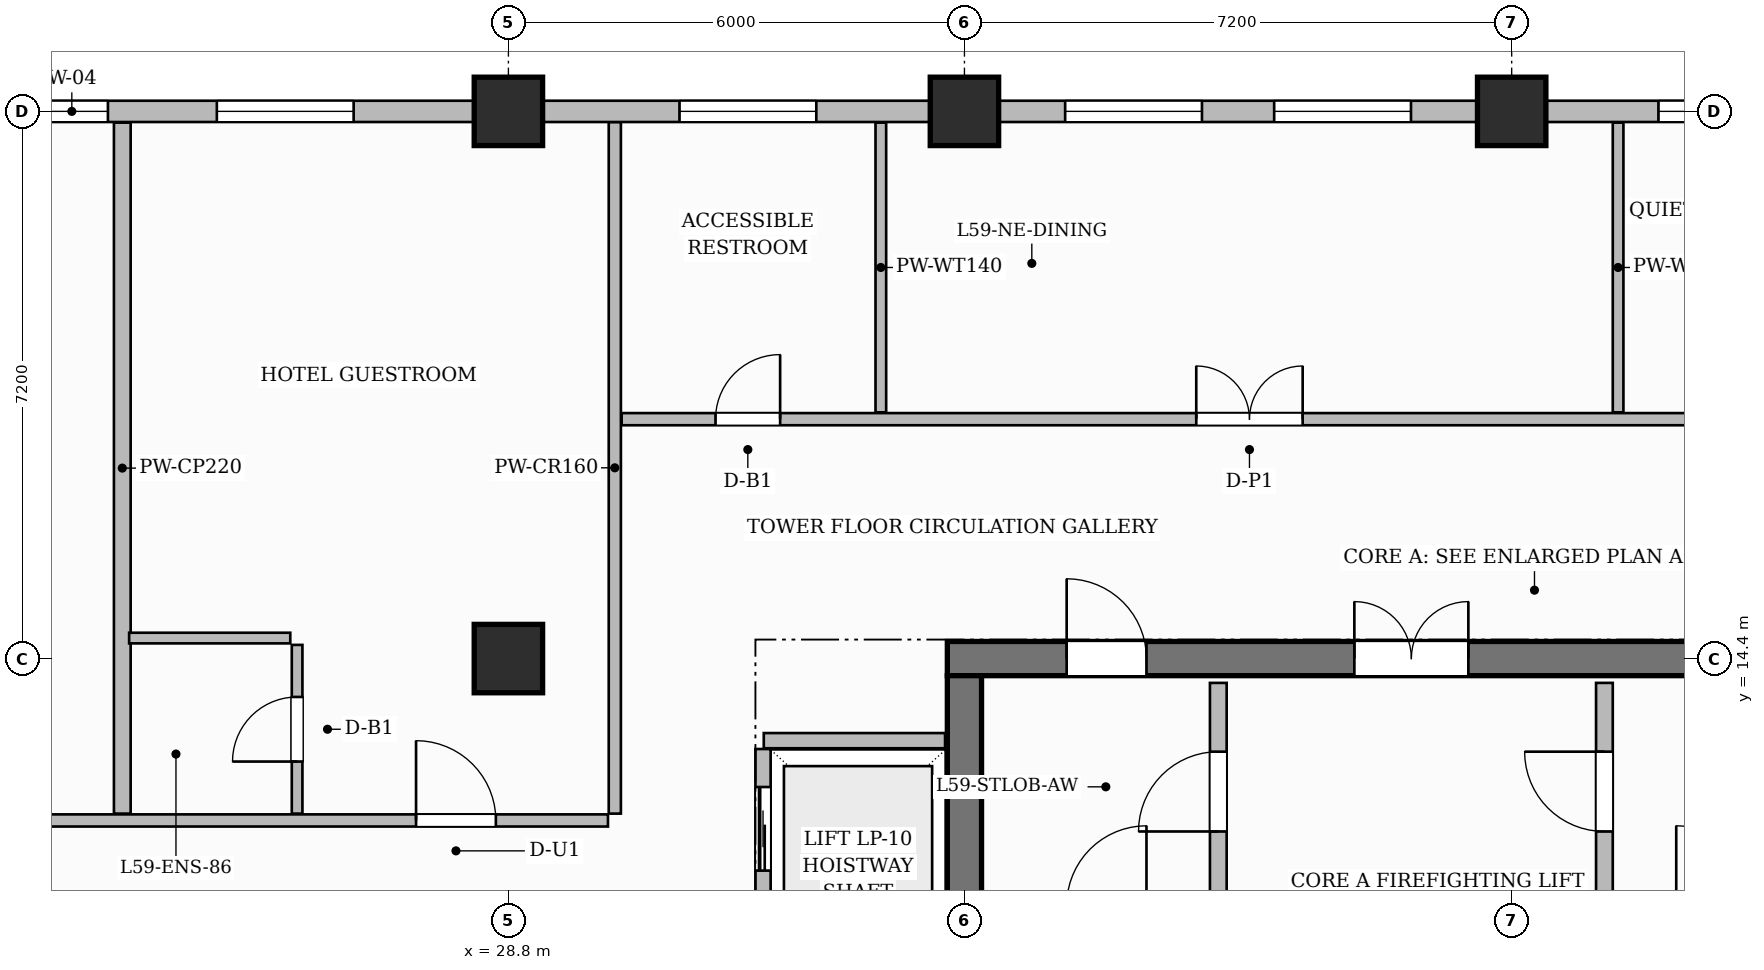
"""IFC4 building model, lengths in metres.
Left out: names, types, materials, properties, quantities, classifications, styles, units other than length and angle.
Written with IfcOpenShell. Run it as: python <this file> out.ifc"""

import sys

from ifc_helpers import new_model, si_unit, direction, frame, frame_2d, origin, origin_2d, place, context, subcontext, project, spatial, rectangle, extrude, source, transform, mapped, element, fill, save


model = new_model("IFC4")
c1 = context("Model", 3, precision=1e-05, world=origin(), true_north=direction((0.0, 1.0)))
c2 = subcontext(c1, "Body", "Model", "MODEL_VIEW")
j1 = project(units=[si_unit("LENGTHUNIT", "METRE"), si_unit("PLANEANGLEUNIT", "RADIAN")], contexts=[c1])
p1 = place(None, origin())
s1 = spatial("IfcSite", under=j1, at=p1, CompositionType="ELEMENT")
p2 = place(p1, origin())
s2 = spatial("IfcBuilding", under=s1, at=p2, CompositionType="ELEMENT")
p3 = place(p2, frame((0.0, 0.0, 236.55)))
s3 = spatial("IfcBuildingStorey", under=s2, at=p3, CompositionType="ELEMENT", Elevation=236.55)
p4 = place(p3, frame((34.575, 14.4, 0.0), z_axis=(0.0, 0.0, 1.0), x_axis=(1.0, 0.0, 0.0)))
e1 = element("IfcWall", 1, at=p4, inside=s3, PredefinedType="SHEAR", context=c2, shape_type="SweptSolid", body=[
    extrude(rectangle(XDim=15.45, YDim=0.45, at=frame_2d((7.725, 0.0))), origin(), (0.0, 0.0, 1.0), 3.85),
])
p5 = place(p4, frame((5.355, 0.0, 0.0)))
e2 = element("IfcOpeningElement", 2, at=p5, cuts=e1, PredefinedType="OPENING", context=c2, shape_type="SweptSolid", body=[
    extrude(rectangle(XDim=1.5, YDim=2.2, at=frame_2d((0.75, 1.1))), frame((0.0, 0.235, 0.0), z_axis=(0.0, -1.0, 0.0), x_axis=(1.0, 0.0, 0.0)), (0.0, 0.0, 1.0), 0.47),
])
p6 = place(p4, frame((1.57, 0.0, 0.0)))
e3 = element("IfcOpeningElement", 3, at=p6, cuts=e1, PredefinedType="OPENING", context=c2, shape_type="SweptSolid", body=[
    extrude(rectangle(XDim=1.05, YDim=2.15, at=frame_2d((0.525, 1.075))), frame((0.0, 0.235, 0.0), z_axis=(0.0, -1.0, 0.0), x_axis=(1.0, 0.0, 0.0)), (0.0, 0.0, 1.0), 0.47),
])
p7 = place(p4, frame((11.2, 0.0, 0.0)))
e4 = element("IfcOpeningElement", 4, at=p7, cuts=e1, PredefinedType="OPENING", context=c2, shape_type="SweptSolid", body=[
    extrude(rectangle(XDim=1.05, YDim=2.15, at=frame_2d((0.525, 1.075))), frame((0.0, 0.235, 0.0), z_axis=(0.0, -1.0, 0.0), x_axis=(1.0, 0.0, 0.0)), (0.0, 0.0, 1.0), 0.47),
])
p8 = place(p3, frame((34.8, 3.825, 0.0), z_axis=(0.0, 0.0, 1.0), x_axis=(0.0, 1.0, 0.0)))
e5 = element("IfcWall", 5, at=p8, inside=s3, PredefinedType="SHEAR", context=c2, shape_type="SweptSolid", body=[
    extrude(rectangle(XDim=10.35, YDim=0.45, at=frame_2d((5.175, 0.0))), origin(), (0.0, 0.0, 1.0), 3.85),
])
m1 = source(origin(), c2, "Body", "SweptSolid", [
    extrude(rectangle(XDim=0.9, YDim=0.9, at=origin_2d()), origin(), (0.0, 0.0, 1.0), 3.85),
])
for number, where, z_axis, x_axis in (
    (6, (28.8, 14.4, 0.0), (0.0, 0.0, 1.0), (1.0, 0.0, 0.0)),
    (7, (28.8, 21.6, 0.0), (0.0, 0.0, 1.0), (1.0, 0.0, 0.0)),
    (8, (34.8, 21.6, 0.0), (0.0, 0.0, 1.0), (1.0, 0.0, 0.0)),
    (9, (42.0, 21.6, 0.0), (0.0, 0.0, 1.0), (1.0, 0.0, 0.0)),
):
    element("IfcColumn", number, at=place(p3, frame(where, z_axis=z_axis, x_axis=x_axis)), inside=s3, PredefinedType="COLUMN", context=c2, shape_type="MappedRepresentation", body=[
        mapped(m1, transform((0.0, 0.0, 0.0), scale=1.0)),
    ])
p9 = place(p3, frame((38.14, 11.22, 0.0), z_axis=(0.0, 0.0, 1.0), x_axis=(0.0, 1.0, 0.0)))
e10 = element("IfcWall", 10, at=p9, inside=s3, PredefinedType="PARTITIONING", context=c2, shape_type="SweptSolid", body=[
    extrude(rectangle(XDim=2.86, YDim=0.22, at=frame_2d((1.43, 0.0))), origin(), (0.0, 0.0, 1.0), 3.6),
])
p10 = place(p9, frame((0.905, 0.0, 0.0)))
e11 = element("IfcOpeningElement", 11, at=p10, cuts=e10, PredefinedType="OPENING", context=c2, shape_type="SweptSolid", body=[
    extrude(rectangle(XDim=1.05, YDim=2.15, at=frame_2d((0.525, 1.075))), frame((0.0, 0.12, 0.0), z_axis=(0.0, -1.0, 0.0), x_axis=(1.0, 0.0, 0.0)), (0.0, 0.0, 1.0), 0.24),
])
p11 = place(p3, frame((43.22, 11.22, 0.0), z_axis=(0.0, 0.0, 1.0), x_axis=(0.0, 1.0, 0.0)))
e12 = element("IfcWall", 12, at=p11, inside=s3, PredefinedType="PARTITIONING", context=c2, shape_type="SweptSolid", body=[
    extrude(rectangle(XDim=2.86, YDim=0.22, at=frame_2d((1.43, 0.0))), origin(), (0.0, 0.0, 1.0), 3.6),
])
p12 = place(p11, frame((0.905, 0.0, 0.0)))
e13 = element("IfcOpeningElement", 13, at=p12, cuts=e12, PredefinedType="OPENING", context=c2, shape_type="SweptSolid", body=[
    extrude(rectangle(XDim=1.05, YDim=2.15, at=frame_2d((0.525, 1.075))), frame((0.0, 0.12, 0.0), z_axis=(0.0, -1.0, 0.0), x_axis=(1.0, 0.0, 0.0)), (0.0, 0.0, 1.0), 0.24),
])
p13 = place(p3, frame((32.16, 13.32, 0.0), z_axis=(0.0, 0.0, 1.0), x_axis=(1.0, 0.0, 0.0)))
e14 = element("IfcWall", 14, at=p13, inside=s3, PredefinedType="PARTITIONING", context=c2, shape_type="SweptSolid", body=[
    extrude(rectangle(XDim=2.385, YDim=0.2, at=frame_2d((1.192, 0.0))), origin(), (0.0, 0.0, 1.0), 3.6),
])
p14 = place(p3, frame((32.15, 4.39, 0.0), z_axis=(0.0, 0.0, 1.0), x_axis=(0.0, 1.0, 0.0)))
e15 = element("IfcWall", 15, at=p14, inside=s3, PredefinedType="PARTITIONING", context=c2, shape_type="SweptSolid", body=[
    extrude(rectangle(XDim=8.82, YDim=0.2, at=frame_2d((4.41, 0.0))), origin(), (0.0, 0.0, 1.0), 3.6),
])
p15 = place(p14, frame((0.5, 0.0, 0.0)))
e16 = element("IfcOpeningElement", 16, at=p15, cuts=e15, PredefinedType="OPENING", context=c2, shape_type="SweptSolid", body=[
    extrude(rectangle(XDim=1.1, YDim=2.2, at=frame_2d((0.55, 1.1))), frame((0.0, 0.11, 0.0), z_axis=(0.0, -1.0, 0.0), x_axis=(1.0, 0.0, 0.0)), (0.0, 0.0, 1.0), 0.22),
])
p16 = place(p14, frame((2.74, 0.0, 0.0)))
e17 = element("IfcOpeningElement", 17, at=p16, cuts=e15, PredefinedType="OPENING", context=c2, shape_type="SweptSolid", body=[
    extrude(rectangle(XDim=1.1, YDim=2.2, at=frame_2d((0.55, 1.1))), frame((0.0, 0.11, 0.0), z_axis=(0.0, -1.0, 0.0), x_axis=(1.0, 0.0, 0.0)), (0.0, 0.0, 1.0), 0.22),
])
p17 = place(p14, frame((4.98, 0.0, 0.0)))
e18 = element("IfcOpeningElement", 18, at=p17, cuts=e15, PredefinedType="OPENING", context=c2, shape_type="SweptSolid", body=[
    extrude(rectangle(XDim=1.1, YDim=2.2, at=frame_2d((0.55, 1.1))), frame((0.0, 0.11, 0.0), z_axis=(0.0, -1.0, 0.0), x_axis=(1.0, 0.0, 0.0)), (0.0, 0.0, 1.0), 0.22),
])
p18 = place(p14, frame((7.22, 0.0, 0.0)))
e19 = element("IfcOpeningElement", 19, at=p18, cuts=e15, PredefinedType="OPENING", context=c2, shape_type="SweptSolid", body=[
    extrude(rectangle(XDim=1.1, YDim=2.2, at=frame_2d((0.55, 1.1))), frame((0.0, 0.11, 0.0), z_axis=(0.0, -1.0, 0.0), x_axis=(1.0, 0.0, 0.0)), (0.0, 0.0, 1.0), 0.22),
])
p19 = place(p3, frame((14.548, 12.27, 0.0), z_axis=(0.0, 0.0, 1.0), x_axis=(1.0, 0.0, 0.0)))
e20 = element("IfcWall", 20, at=p19, inside=s3, PredefinedType="PARTITIONING", context=c2, shape_type="SweptSolid", body=[
    extrude(rectangle(XDim=15.562, YDim=0.16, at=frame_2d((7.781, 0.0))), origin(), (0.0, 0.0, 1.0), 3.6),
])
p20 = place(p19, frame((5.212, 0.0, 0.0)))
e21 = element("IfcOpeningElement", 21, at=p20, cuts=e20, PredefinedType="OPENING", context=c2, shape_type="SweptSolid", body=[
    extrude(rectangle(XDim=1.0, YDim=2.2, at=frame_2d((0.5, 1.1))), frame((0.0, 0.09, 0.0), z_axis=(0.0, -1.0, 0.0), x_axis=(1.0, 0.0, 0.0)), (0.0, 0.0, 1.0), 0.18),
])
p21 = place(p19, frame((13.037, 0.0, 0.0)))
e22 = element("IfcOpeningElement", 22, at=p21, cuts=e20, PredefinedType="OPENING", context=c2, shape_type="SweptSolid", body=[
    extrude(rectangle(XDim=1.05, YDim=2.25, at=frame_2d((0.525, 1.125))), frame((0.0, 0.09, 0.0), z_axis=(0.0, -1.0, 0.0), x_axis=(1.0, 0.0, 0.0)), (0.0, 0.0, 1.0), 0.18),
])
p22 = place(p3, frame((30.2, 12.36, 0.0), z_axis=(0.0, 0.0, 1.0), x_axis=(0.0, 1.0, 0.0)))
e23 = element("IfcWall", 23, at=p22, inside=s3, PredefinedType="PARTITIONING", context=c2, shape_type="SweptSolid", body=[
    extrude(rectangle(XDim=9.1, YDim=0.16, at=frame_2d((4.55, 0.0))), origin(), (0.0, 0.0, 1.0), 3.6),
])
p23 = place(p3, frame((30.29, 17.55, 0.0), z_axis=(0.0, 0.0, 1.0), x_axis=(1.0, 0.0, 0.0)))
e24 = element("IfcWall", 24, at=p23, inside=s3, PredefinedType="PARTITIONING", context=c2, shape_type="SweptSolid", body=[
    extrude(rectangle(XDim=19.37, YDim=0.16, at=frame_2d((9.685, 0.0))), origin(), (0.0, 0.0, 1.0), 3.6),
])
p24 = place(p23, frame((1.235, 0.0, 0.0)))
e25 = element("IfcOpeningElement", 25, at=p24, cuts=e24, PredefinedType="OPENING", context=c2, shape_type="SweptSolid", body=[
    extrude(rectangle(XDim=0.85, YDim=2.1, at=frame_2d((0.425, 1.05))), frame((0.0, 0.09, 0.0), z_axis=(0.0, -1.0, 0.0), x_axis=(1.0, 0.0, 0.0)), (0.0, 0.0, 1.0), 0.18),
])
p25 = place(p23, frame((7.56, 0.0, 0.0)))
e26 = element("IfcOpeningElement", 26, at=p25, cuts=e24, PredefinedType="OPENING", context=c2, shape_type="SweptSolid", body=[
    extrude(rectangle(XDim=1.4, YDim=2.35, at=frame_2d((0.7, 1.175))), frame((0.0, 0.09, 0.0), z_axis=(0.0, -1.0, 0.0), x_axis=(1.0, 0.0, 0.0)), (0.0, 0.0, 1.0), 0.18),
])
p26 = place(p23, frame((15.785, 0.0, 0.0)))
e27 = element("IfcOpeningElement", 27, at=p26, cuts=e24, PredefinedType="OPENING", context=c2, shape_type="SweptSolid", body=[
    extrude(rectangle(XDim=0.95, YDim=2.15, at=frame_2d((0.475, 1.075))), frame((0.0, 0.09, 0.0), z_axis=(0.0, -1.0, 0.0), x_axis=(1.0, 0.0, 0.0)), (0.0, 0.0, 1.0), 0.18),
])
for number, where, z_axis, x_axis in (
    (28, (33.7, 17.64, 0.0), (0.0, 0.0, 1.0), (0.0, 1.0, 0.0)),
    (29, (43.4, 17.64, 0.0), (0.0, 0.0, 1.0), (0.0, 1.0, 0.0)),
):
    element("IfcWall", number, at=place(p3, frame(where, z_axis=z_axis, x_axis=x_axis)), inside=s3, PredefinedType="PARTITIONING", context=c2, shape_type="SweptSolid", body=[
        extrude(rectangle(XDim=3.812, YDim=0.14, at=frame_2d((1.906, 0.0))), origin(), (0.0, 0.0, 1.0), 3.6),
    ])
p27 = place(p3, frame((23.72, 12.36, 0.0), z_axis=(0.0, 0.0, 1.0), x_axis=(0.0, 1.0, 0.0)))
e30 = element("IfcWall", 30, at=p27, inside=s3, PredefinedType="PARTITIONING", context=c2, shape_type="SweptSolid", body=[
    extrude(rectangle(XDim=9.092, YDim=0.22, at=frame_2d((4.546, 0.0))), origin(), (0.0, 0.0, 1.0), 3.6),
])
p28 = place(p3, frame((26.02, 12.36, 0.0), z_axis=(0.0, 0.0, 1.0), x_axis=(0.0, 1.0, 0.0)))
e31 = element("IfcWall", 31, at=p28, inside=s3, PredefinedType="PARTITIONING", context=c2, shape_type="SweptSolid", body=[
    extrude(rectangle(XDim=2.22, YDim=0.14, at=frame_2d((1.11, 0.0))), origin(), (0.0, 0.0, 1.0), 3.6),
])
p29 = place(p28, frame((0.685, 0.0, 0.0)))
e32 = element("IfcOpeningElement", 32, at=p29, cuts=e31, PredefinedType="OPENING", context=c2, shape_type="SweptSolid", body=[
    extrude(rectangle(XDim=0.85, YDim=2.1, at=frame_2d((0.425, 1.05))), frame((0.0, 0.08, 0.0), z_axis=(0.0, -1.0, 0.0), x_axis=(1.0, 0.0, 0.0)), (0.0, 0.0, 1.0), 0.16),
])
p30 = place(p3, frame((23.81, 14.67, 0.0), z_axis=(0.0, 0.0, 1.0), x_axis=(1.0, 0.0, 0.0)))
e33 = element("IfcWall", 33, at=p30, inside=s3, PredefinedType="PARTITIONING", context=c2, shape_type="SweptSolid", body=[
    extrude(rectangle(XDim=2.12, YDim=0.14, at=frame_2d((1.06, 0.0))), origin(), (0.0, 0.0, 1.0), 3.135),
])
p31 = place(p3, frame((14.4, 21.6, 0.0), z_axis=(0.0, 0.0, 1.0), x_axis=(1.0, 0.0, 0.0)))
e34 = element("IfcWall", 34, at=p31, inside=s3, PredefinedType="SOLIDWALL", context=c2, shape_type="SweptSolid", body=[
    extrude(rectangle(XDim=35.4, YDim=0.28, at=frame_2d((17.7, 0.0))), origin(), (0.0, 0.0, 1.0), 3.135),
])
p32 = place(p31, frame((0.85, 0.0, 0.0)))
e35 = element("IfcOpeningElement", 35, at=p32, cuts=e34, PredefinedType="OPENING", context=c2, shape_type="SweptSolid", body=[
    extrude(rectangle(XDim=1.2, YDim=2.2, at=frame_2d((0.6, 1.1))), frame((0.0, 0.15, 0.0), z_axis=(0.0, -1.0, 0.0), x_axis=(1.0, 0.0, 0.0)), (0.0, 0.0, 1.0), 0.3),
])
p33 = place(p31, frame((3.475, 0.0, 0.8)))
e36 = element("IfcOpeningElement", 36, at=p33, cuts=e34, PredefinedType="OPENING", context=c2, shape_type="SweptSolid", body=[
    extrude(rectangle(XDim=1.8, YDim=1.85, at=frame_2d((0.9, 0.925))), frame((0.0, 0.15, 0.0), z_axis=(0.0, -1.0, 0.0), x_axis=(1.0, 0.0, 0.0)), (0.0, 0.0, 1.0), 0.3),
])
p34 = place(p31, frame((8.181, 0.0, 0.8)))
e37 = element("IfcOpeningElement", 37, at=p34, cuts=e34, PredefinedType="OPENING", context=c2, shape_type="SweptSolid", body=[
    extrude(rectangle(XDim=0.95, YDim=1.75, at=frame_2d((0.475, 0.875))), frame((0.0, 0.15, 0.0), z_axis=(0.0, -1.0, 0.0), x_axis=(1.0, 0.0, 0.0)), (0.0, 0.0, 1.0), 0.3),
])
p35 = place(p31, frame((10.564, 0.0, 0.8)))
e38 = element("IfcOpeningElement", 38, at=p35, cuts=e34, PredefinedType="OPENING", context=c2, shape_type="SweptSolid", body=[
    extrude(rectangle(XDim=1.8, YDim=1.85, at=frame_2d((0.9, 0.925))), frame((0.0, 0.15, 0.0), z_axis=(0.0, -1.0, 0.0), x_axis=(1.0, 0.0, 0.0)), (0.0, 0.0, 1.0), 0.3),
])
p36 = place(p31, frame((16.651, 0.0, 0.8)))
e39 = element("IfcOpeningElement", 39, at=p36, cuts=e34, PredefinedType="OPENING", context=c2, shape_type="SweptSolid", body=[
    extrude(rectangle(XDim=1.8, YDim=1.85, at=frame_2d((0.9, 0.925))), frame((0.0, 0.15, 0.0), z_axis=(0.0, -1.0, 0.0), x_axis=(1.0, 0.0, 0.0)), (0.0, 0.0, 1.0), 0.3),
])
p37 = place(p31, frame((21.725, 0.0, 0.8)))
e40 = element("IfcOpeningElement", 40, at=p37, cuts=e34, PredefinedType="OPENING", context=c2, shape_type="SweptSolid", body=[
    extrude(rectangle(XDim=1.8, YDim=1.85, at=frame_2d((0.9, 0.925))), frame((0.0, 0.15, 0.0), z_axis=(0.0, -1.0, 0.0), x_axis=(1.0, 0.0, 0.0)), (0.0, 0.0, 1.0), 0.3),
])
p38 = place(p31, frame((24.475, 0.0, 0.8)))
e41 = element("IfcOpeningElement", 41, at=p38, cuts=e34, PredefinedType="OPENING", context=c2, shape_type="SweptSolid", body=[
    extrude(rectangle(XDim=1.8, YDim=1.85, at=frame_2d((0.9, 0.925))), frame((0.0, 0.15, 0.0), z_axis=(0.0, -1.0, 0.0), x_axis=(1.0, 0.0, 0.0)), (0.0, 0.0, 1.0), 0.3),
])
p39 = place(p31, frame((29.531, 0.0, 0.8)))
e42 = element("IfcOpeningElement", 42, at=p39, cuts=e34, PredefinedType="OPENING", context=c2, shape_type="SweptSolid", body=[
    extrude(rectangle(XDim=1.8, YDim=1.85, at=frame_2d((0.9, 0.925))), frame((0.0, 0.15, 0.0), z_axis=(0.0, -1.0, 0.0), x_axis=(1.0, 0.0, 0.0)), (0.0, 0.0, 1.0), 0.3),
])
p40 = place(p31, frame((32.277, 0.0, 0.8)))
e43 = element("IfcOpeningElement", 43, at=p40, cuts=e34, PredefinedType="OPENING", context=c2, shape_type="SweptSolid", body=[
    extrude(rectangle(XDim=1.8, YDim=1.85, at=frame_2d((0.9, 0.925))), frame((0.0, 0.15, 0.0), z_axis=(0.0, -1.0, 0.0), x_axis=(1.0, 0.0, 0.0)), (0.0, 0.0, 1.0), 0.3),
])
m2 = source(origin(), c2, "Body", "SweptSolid", [
    extrude(rectangle(XDim=1.05, YDim=2.15, at=frame_2d((0.525, 1.075))), frame((0.0, 0.025, 0.0), z_axis=(0.0, -1.0, 0.0), x_axis=(1.0, 0.0, 0.0)), (0.0, 0.0, 1.0), 0.05),
])
p41 = place(p10, origin())
e44 = element("IfcDoor", 44, at=p41, inside=s3, OperationType="SINGLE_SWING_LEFT", PredefinedType="DOOR", context=c2, shape_type="MappedRepresentation", body=[
    mapped(m2, transform((0.0, 0.0, 0.0), scale=1.0)),
])
fill(e11, e44)
p42 = place(p12, origin())
e45 = element("IfcDoor", 45, at=p42, inside=s3, OperationType="SINGLE_SWING_RIGHT", PredefinedType="DOOR", context=c2, shape_type="MappedRepresentation", body=[
    mapped(m2, transform((0.0, 0.0, 0.0), scale=1.0)),
])
fill(e13, e45)
m3 = source(origin(), c2, "Body", "SweptSolid", [
    extrude(rectangle(XDim=1.5, YDim=2.2, at=frame_2d((0.75, 1.1))), frame((0.0, 0.025, 0.0), z_axis=(0.0, -1.0, 0.0), x_axis=(1.0, 0.0, 0.0)), (0.0, 0.0, 1.0), 0.05),
])
p43 = place(p5, origin())
e46 = element("IfcDoor", 46, at=p43, inside=s3, OperationType="DOUBLE_DOOR_SINGLE_SWING", PredefinedType="DOOR", context=c2, shape_type="MappedRepresentation", body=[
    mapped(m3, transform((0.0, 0.0, 0.0), scale=1.0)),
])
fill(e2, e46)
p44 = place(p6, origin())
e47 = element("IfcDoor", 47, at=p44, inside=s3, OperationType="SINGLE_SWING_LEFT", PredefinedType="DOOR", context=c2, shape_type="MappedRepresentation", body=[
    mapped(m2, transform((0.0, 0.0, 0.0), scale=1.0)),
])
fill(e3, e47)
m4 = source(origin(), c2, "Body", "SweptSolid", [
    extrude(rectangle(XDim=0.85, YDim=2.1, at=frame_2d((0.425, 1.05))), frame((0.0, 0.025, 0.0), z_axis=(0.0, -1.0, 0.0), x_axis=(1.0, 0.0, 0.0)), (0.0, 0.0, 1.0), 0.05),
])
p45 = place(p24, origin())
e48 = element("IfcDoor", 48, at=p45, inside=s3, OperationType="SINGLE_SWING_RIGHT", PredefinedType="DOOR", context=c2, shape_type="MappedRepresentation", body=[
    mapped(m4, transform((0.0, 0.0, 0.0), scale=1.0)),
])
fill(e25, e48)
m5 = source(origin(), c2, "Body", "SweptSolid", [
    extrude(rectangle(XDim=1.4, YDim=2.35, at=frame_2d((0.7, 1.175))), frame((0.0, 0.025, 0.0), z_axis=(0.0, -1.0, 0.0), x_axis=(1.0, 0.0, 0.0)), (0.0, 0.0, 1.0), 0.05),
])
p46 = place(p25, origin())
e49 = element("IfcDoor", 49, at=p46, inside=s3, OperationType="DOUBLE_DOOR_SINGLE_SWING", PredefinedType="DOOR", context=c2, shape_type="MappedRepresentation", body=[
    mapped(m5, transform((0.0, 0.0, 0.0), scale=1.0)),
])
fill(e26, e49)
p47 = place(p29, origin())
e50 = element("IfcDoor", 50, at=p47, inside=s3, OperationType="SINGLE_SWING_LEFT", PredefinedType="DOOR", context=c2, shape_type="MappedRepresentation", body=[
    mapped(m4, transform((0.0, 0.0, 0.0), scale=1.0)),
])
fill(e32, e50)
m6 = source(origin(), c2, "Body", "SweptSolid", [
    extrude(rectangle(XDim=1.05, YDim=2.25, at=frame_2d((0.525, 1.125))), frame((0.0, 0.025, 0.0), z_axis=(0.0, -1.0, 0.0), x_axis=(1.0, 0.0, 0.0)), (0.0, 0.0, 1.0), 0.05),
])
p48 = place(p21, origin())
e51 = element("IfcDoor", 51, at=p48, inside=s3, OperationType="SINGLE_SWING_LEFT", PredefinedType="DOOR", context=c2, shape_type="MappedRepresentation", body=[
    mapped(m6, transform((0.0, 0.0, 0.0), scale=1.0)),
])
fill(e22, e51)
m7 = source(origin(), c2, "Body", "SweptSolid", [
    extrude(rectangle(XDim=1.1, YDim=2.2, at=frame_2d((0.55, 1.1))), frame((0.0, 0.025, 0.0), z_axis=(0.0, -1.0, 0.0), x_axis=(1.0, 0.0, 0.0)), (0.0, 0.0, 1.0), 0.05),
])
p49 = place(p18, origin())
e52 = element("IfcDoor", 52, at=p49, inside=s3, OperationType="SLIDING_TO_LEFT", PredefinedType="DOOR", context=c2, shape_type="MappedRepresentation", body=[
    mapped(m7, transform((0.0, 0.0, 0.0), scale=1.0)),
])
fill(e19, e52)
m8 = source(origin(), c2, "Body", "SweptSolid", [
    extrude(rectangle(XDim=0.95, YDim=1.75, at=frame_2d((0.475, 0.875))), frame((0.0, 0.03, 0.0), z_axis=(0.0, -1.0, 0.0), x_axis=(1.0, 0.0, 0.0)), (0.0, 0.0, 1.0), 0.06),
])
p50 = place(p34, origin())
e53 = element("IfcWindow", 53, at=p50, inside=s3, PartitioningType="SINGLE_PANEL", PredefinedType="WINDOW", context=c2, shape_type="MappedRepresentation", body=[
    mapped(m8, transform((0.0, 0.0, 0.0), scale=1.0)),
])
fill(e37, e53)
m9 = source(origin(), c2, "Body", "SweptSolid", [
    extrude(rectangle(XDim=1.8, YDim=1.85, at=frame_2d((0.9, 0.925))), frame((0.0, 0.03, 0.0), z_axis=(0.0, -1.0, 0.0), x_axis=(1.0, 0.0, 0.0)), (0.0, 0.0, 1.0), 0.06),
])
p51 = place(p35, origin())
e54 = element("IfcWindow", 54, at=p51, inside=s3, PartitioningType="DOUBLE_PANEL_VERTICAL", PredefinedType="WINDOW", context=c2, shape_type="MappedRepresentation", body=[
    mapped(m9, transform((0.0, 0.0, 0.0), scale=1.0)),
])
fill(e38, e54)
p52 = place(p36, origin())
e55 = element("IfcWindow", 55, at=p52, inside=s3, PartitioningType="DOUBLE_PANEL_VERTICAL", PredefinedType="WINDOW", context=c2, shape_type="MappedRepresentation", body=[
    mapped(m9, transform((0.0, 0.0, 0.0), scale=1.0)),
])
fill(e39, e55)
p53 = place(p37, origin())
e56 = element("IfcWindow", 56, at=p53, inside=s3, PartitioningType="DOUBLE_PANEL_VERTICAL", PredefinedType="WINDOW", context=c2, shape_type="MappedRepresentation", body=[
    mapped(m9, transform((0.0, 0.0, 0.0), scale=1.0)),
])
fill(e40, e56)
p54 = place(p38, origin())
e57 = element("IfcWindow", 57, at=p54, inside=s3, PartitioningType="DOUBLE_PANEL_VERTICAL", PredefinedType="WINDOW", context=c2, shape_type="MappedRepresentation", body=[
    mapped(m9, transform((0.0, 0.0, 0.0), scale=1.0)),
])
fill(e41, e57)
p55 = place(p39, origin())
e58 = element("IfcWindow", 58, at=p55, inside=s3, PartitioningType="DOUBLE_PANEL_VERTICAL", PredefinedType="WINDOW", context=c2, shape_type="MappedRepresentation", body=[
    mapped(m9, transform((0.0, 0.0, 0.0), scale=1.0)),
])
fill(e42, e58)
save(model, sys.argv[1])
